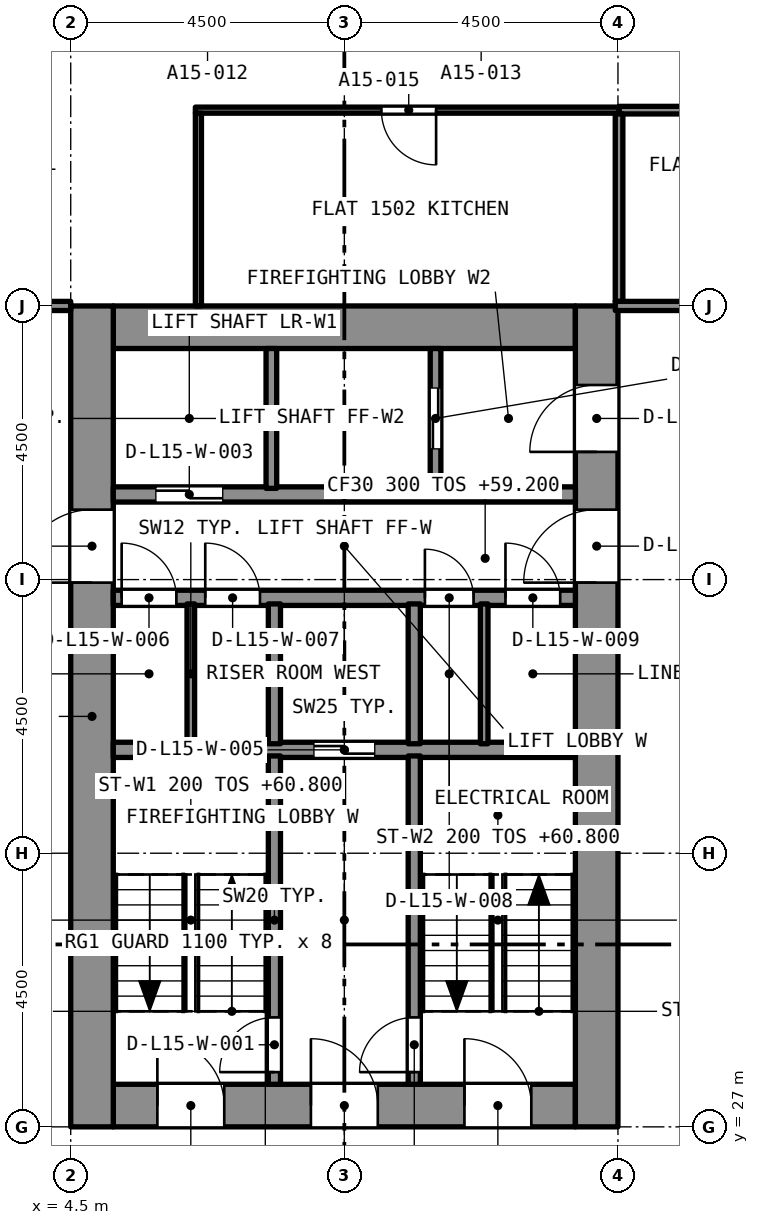
"""IFC4 building model, lengths in metres.
Left out: names, types, materials, properties, quantities, classifications, styles, units other than length and angle.
Written with IfcOpenShell. Run it as: python <this file> out.ifc"""

import sys

from ifc_helpers import new_model, si_unit, direction, frame, frame_2d, origin, place, context, subcontext, project, spatial, rectangle, extrude, element, fill, save


model = new_model("IFC4")
c1 = context("Model", 3, precision=1e-05, world=origin(), true_north=direction((0.0, 1.0)))
c2 = subcontext(c1, "Body", "Model", "MODEL_VIEW")
j1 = project(units=[si_unit("LENGTHUNIT", "METRE"), si_unit("PLANEANGLEUNIT", "RADIAN")], contexts=[c1])
p1 = place(None, origin())
s1 = spatial("IfcSite", under=j1, at=p1, CompositionType="ELEMENT")
p2 = place(p1, origin())
s2 = spatial("IfcBuilding", under=s1, at=p2, CompositionType="ELEMENT")
p3 = place(p2, frame((0.0, 0.0, 59.2)))
s3 = spatial("IfcBuildingStorey", under=s2, at=p3, CompositionType="ELEMENT", Elevation=59.2)
p4 = place(p3, frame((5.2, 27.35, 0.0), z_axis=(0.0, 0.0, 1.0), x_axis=(1.0, 0.0, 0.0)))
e1 = element("IfcWall", 1, at=p4, inside=s3, PredefinedType="SOLIDWALL", context=c2, shape_type="SweptSolid", body=[
    extrude(rectangle(XDim=7.6, YDim=0.7, at=frame_2d((3.8, 0.0))), origin(), (0.0, 0.0, 1.0), 3.2),
])
p5 = place(p4, frame((0.725, 0.0, 0.0)))
e2 = element("IfcOpeningElement", 2, at=p5, cuts=e1, PredefinedType="OPENING", context=c2, shape_type="SweptSolid", body=[
    extrude(rectangle(XDim=1.1, YDim=2.1, at=frame_2d((0.55, 1.05))), frame((0.0, 0.36, 0.0), z_axis=(0.0, -1.0, 0.0), x_axis=(1.0, 0.0, 0.0)), (0.0, 0.0, 1.0), 0.72),
])
p6 = place(p4, frame((3.25, 0.0, 0.0)))
e3 = element("IfcOpeningElement", 3, at=p6, cuts=e1, PredefinedType="OPENING", context=c2, shape_type="SweptSolid", body=[
    extrude(rectangle(XDim=1.1, YDim=2.1, at=frame_2d((0.55, 1.05))), frame((0.0, 0.36, 0.0), z_axis=(0.0, -1.0, 0.0), x_axis=(1.0, 0.0, 0.0)), (0.0, 0.0, 1.0), 0.72),
])
p7 = place(p4, frame((5.775, 0.0, 0.0)))
e4 = element("IfcOpeningElement", 4, at=p7, cuts=e1, PredefinedType="OPENING", context=c2, shape_type="SweptSolid", body=[
    extrude(rectangle(XDim=1.1, YDim=2.1, at=frame_2d((0.55, 1.05))), frame((0.0, 0.36, 0.0), z_axis=(0.0, -1.0, 0.0), x_axis=(1.0, 0.0, 0.0)), (0.0, 0.0, 1.0), 0.72),
])
p8 = place(p3, frame((5.2, 40.15, 0.0), z_axis=(0.0, 0.0, 1.0), x_axis=(1.0, 0.0, 0.0)))
e5 = element("IfcWall", 5, at=p8, inside=s3, PredefinedType="SOLIDWALL", context=c2, shape_type="SweptSolid", body=[
    extrude(rectangle(XDim=7.6, YDim=0.7, at=frame_2d((3.8, 0.0))), origin(), (0.0, 0.0, 1.0), 3.2),
])
p9 = place(p3, frame((4.85, 27.0, 0.0), z_axis=(0.0, 0.0, 1.0), x_axis=(0.0, 1.0, 0.0)))
e6 = element("IfcWall", 6, at=p9, inside=s3, PredefinedType="SOLIDWALL", context=c2, shape_type="SweptSolid", body=[
    extrude(rectangle(XDim=13.5, YDim=0.7, at=frame_2d((6.75, 0.0))), origin(), (0.0, 0.0, 1.0), 3.2),
])
p10 = place(p9, frame((8.95, 0.0, 0.0)))
e7 = element("IfcOpeningElement", 7, at=p10, cuts=e6, PredefinedType="OPENING", context=c2, shape_type="SweptSolid", body=[
    extrude(rectangle(XDim=1.2, YDim=2.1, at=frame_2d((0.6, 1.05))), frame((0.0, 0.36, 0.0), z_axis=(0.0, -1.0, 0.0), x_axis=(1.0, 0.0, 0.0)), (0.0, 0.0, 1.0), 0.72),
])
p11 = place(p3, frame((13.15, 27.0, 0.0), z_axis=(0.0, 0.0, 1.0), x_axis=(0.0, 1.0, 0.0)))
e8 = element("IfcWall", 8, at=p11, inside=s3, PredefinedType="SOLIDWALL", context=c2, shape_type="SweptSolid", body=[
    extrude(rectangle(XDim=13.5, YDim=0.7, at=frame_2d((6.75, 0.0))), origin(), (0.0, 0.0, 1.0), 3.2),
])
p12 = place(p11, frame((11.1, 0.0, 0.0)))
e9 = element("IfcOpeningElement", 9, at=p12, cuts=e8, PredefinedType="OPENING", context=c2, shape_type="SweptSolid", body=[
    extrude(rectangle(XDim=1.1, YDim=2.1, at=frame_2d((0.55, 1.05))), frame((0.0, 0.36, 0.0), z_axis=(0.0, -1.0, 0.0), x_axis=(1.0, 0.0, 0.0)), (0.0, 0.0, 1.0), 0.72),
])
p13 = place(p11, frame((8.95, 0.0, 0.0)))
e10 = element("IfcOpeningElement", 10, at=p13, cuts=e8, PredefinedType="OPENING", context=c2, shape_type="SweptSolid", body=[
    extrude(rectangle(XDim=1.2, YDim=2.1, at=frame_2d((0.6, 1.05))), frame((0.0, 0.36, 0.0), z_axis=(0.0, -1.0, 0.0), x_axis=(1.0, 0.0, 0.0)), (0.0, 0.0, 1.0), 0.72),
])
p14 = place(p3, frame((17.875, 43.72, 0.0), z_axis=(0.0, 0.0, 1.0), x_axis=(-1.0, 0.0, 0.0)))
e11 = element("IfcWall", 11, at=p14, inside=s3, PredefinedType="PARTITIONING", context=c2, shape_type="SweptSolid", body=[
    extrude(rectangle(XDim=4.357, YDim=0.125, at=frame_2d((2.178, 0.0))), origin(), (0.0, 0.0, 1.0), 2.9),
])
p15 = place(p14, frame((1.716, 0.0, 0.0)))
e12 = element("IfcOpeningElement", 12, at=p15, cuts=e11, PredefinedType="OPENING", context=c2, shape_type="SweptSolid", body=[
    extrude(rectangle(XDim=0.8, YDim=2.1, at=frame_2d((0.4, 1.05))), frame((0.0, 0.073, 0.0), z_axis=(0.0, -1.0, 0.0), x_axis=(1.0, 0.0, 0.0)), (0.0, 0.0, 1.0), 0.145),
])
p16 = place(p3, frame((13.518, 40.575, 0.0), z_axis=(0.0, 0.0, 1.0), x_axis=(0.0, 1.0, 0.0)))
e13 = element("IfcWall", 13, at=p16, inside=s3, PredefinedType="PARTITIONING", context=c2, shape_type="SweptSolid", body=[
    extrude(rectangle(XDim=3.083, YDim=0.125, at=frame_2d((1.541, 0.0))), origin(), (0.0, 0.0, 1.0), 2.9),
])
p17 = place(p3, frame((13.456, 40.5, 0.0), z_axis=(0.0, 0.0, 1.0), x_axis=(1.0, 0.0, 0.0)))
e14 = element("IfcWall", 14, at=p17, inside=s3, PredefinedType="PARTITIONING", context=c2, shape_type="SweptSolid", body=[
    extrude(rectangle(XDim=3.844, YDim=0.15, at=frame_2d((1.922, 0.0))), origin(), (0.0, 0.0, 1.0), 2.9),
])
p18 = place(p3, frame((13.518, 43.72, 0.0), z_axis=(0.0, 0.0, 1.0), x_axis=(-1.0, 0.0, 0.0)))
e15 = element("IfcWall", 15, at=p18, inside=s3, PredefinedType="PARTITIONING", context=c2, shape_type="SweptSolid", body=[
    extrude(rectangle(XDim=6.968, YDim=0.1, at=frame_2d((3.484, 0.0))), origin(), (0.0, 0.0, 1.0), 2.9),
])
p19 = place(p18, frame((3.009, 0.0, 0.0)))
e16 = element("IfcOpeningElement", 16, at=p19, cuts=e15, PredefinedType="OPENING", context=c2, shape_type="SweptSolid", body=[
    extrude(rectangle(XDim=0.9, YDim=2.1, at=frame_2d((0.45, 1.05))), frame((0.0, 0.06, 0.0), z_axis=(0.0, -1.0, 0.0), x_axis=(1.0, 0.0, 0.0)), (0.0, 0.0, 1.0), 0.12),
])
p20 = place(p3, frame((6.6, 40.5, 0.0), z_axis=(0.0, 0.0, 1.0), x_axis=(0.0, 1.0, 0.0)))
e17 = element("IfcWall", 17, at=p20, inside=s3, PredefinedType="PARTITIONING", context=c2, shape_type="SweptSolid", body=[
    extrude(rectangle(XDim=3.17, YDim=0.1, at=frame_2d((1.585, 0.0))), origin(), (0.0, 0.0, 1.0), 2.9),
])
p21 = place(p3, frame((0.7, 40.5, 0.0), z_axis=(0.0, 0.0, 1.0), x_axis=(1.0, 0.0, 0.0)))
e18 = element("IfcWall", 18, at=p21, inside=s3, PredefinedType="PARTITIONING", context=c2, shape_type="SweptSolid", body=[
    extrude(rectangle(XDim=3.8, YDim=0.15, at=frame_2d((1.9, 0.0))), origin(), (0.0, 0.0, 1.0), 2.9),
])
p22 = place(p21, frame((1.05, 0.0, 0.0)))
e19 = element("IfcOpeningElement", 19, at=p22, cuts=e18, PredefinedType="OPENING", context=c2, shape_type="SweptSolid", body=[
    extrude(rectangle(XDim=1.0, YDim=2.1, at=frame_2d((0.5, 1.05))), frame((0.0, 0.085, 0.0), z_axis=(0.0, -1.0, 0.0), x_axis=(1.0, 0.0, 0.0)), (0.0, 0.0, 1.0), 0.17),
])
p23 = place(p3, frame((5.2, 33.2, 0.0), z_axis=(0.0, 0.0, 1.0), x_axis=(1.0, 0.0, 0.0)))
e20 = element("IfcWall", 20, at=p23, inside=s3, PredefinedType="SOLIDWALL", context=c2, shape_type="SweptSolid", body=[
    extrude(rectangle(XDim=7.6, YDim=0.25, at=frame_2d((3.8, 0.0))), origin(), (0.0, 0.0, 1.0), 2.9),
])
p24 = place(p23, frame((3.3, 0.0, 0.0)))
e21 = element("IfcOpeningElement", 21, at=p24, cuts=e20, PredefinedType="OPENING", context=c2, shape_type="SweptSolid", body=[
    extrude(rectangle(XDim=1.0, YDim=2.1, at=frame_2d((0.5, 1.05))), frame((0.0, 0.135, 0.0), z_axis=(0.0, -1.0, 0.0), x_axis=(1.0, 0.0, 0.0)), (0.0, 0.0, 1.0), 0.27),
])
p25 = place(p3, frame((5.2, 35.7, 0.0), z_axis=(0.0, 0.0, 1.0), x_axis=(1.0, 0.0, 0.0)))
e22 = element("IfcWall", 22, at=p25, inside=s3, PredefinedType="SOLIDWALL", context=c2, shape_type="SweptSolid", body=[
    extrude(rectangle(XDim=7.6, YDim=0.25, at=frame_2d((3.8, 0.0))), origin(), (0.0, 0.0, 1.0), 2.9),
])
p26 = place(p25, frame((0.137, 0.0, 0.0)))
e23 = element("IfcOpeningElement", 23, at=p26, cuts=e22, PredefinedType="OPENING", context=c2, shape_type="SweptSolid", body=[
    extrude(rectangle(XDim=0.9, YDim=2.1, at=frame_2d((0.45, 1.05))), frame((0.0, 0.135, 0.0), z_axis=(0.0, -1.0, 0.0), x_axis=(1.0, 0.0, 0.0)), (0.0, 0.0, 1.0), 0.27),
])
p27 = place(p25, frame((1.512, 0.0, 0.0)))
e24 = element("IfcOpeningElement", 24, at=p27, cuts=e22, PredefinedType="OPENING", context=c2, shape_type="SweptSolid", body=[
    extrude(rectangle(XDim=0.9, YDim=2.1, at=frame_2d((0.45, 1.05))), frame((0.0, 0.135, 0.0), z_axis=(0.0, -1.0, 0.0), x_axis=(1.0, 0.0, 0.0)), (0.0, 0.0, 1.0), 0.27),
])
p28 = place(p25, frame((5.125, 0.0, 0.0)))
e25 = element("IfcOpeningElement", 25, at=p28, cuts=e22, PredefinedType="OPENING", context=c2, shape_type="SweptSolid", body=[
    extrude(rectangle(XDim=0.8, YDim=2.1, at=frame_2d((0.4, 1.05))), frame((0.0, 0.135, 0.0), z_axis=(0.0, -1.0, 0.0), x_axis=(1.0, 0.0, 0.0)), (0.0, 0.0, 1.0), 0.27),
])
p29 = place(p25, frame((6.45, 0.0, 0.0)))
e26 = element("IfcOpeningElement", 26, at=p29, cuts=e22, PredefinedType="OPENING", context=c2, shape_type="SweptSolid", body=[
    extrude(rectangle(XDim=0.9, YDim=2.1, at=frame_2d((0.45, 1.05))), frame((0.0, 0.135, 0.0), z_axis=(0.0, -1.0, 0.0), x_axis=(1.0, 0.0, 0.0)), (0.0, 0.0, 1.0), 0.27),
])
p30 = place(p3, frame((5.2, 37.4, 0.0), z_axis=(0.0, 0.0, 1.0), x_axis=(1.0, 0.0, 0.0)))
e27 = element("IfcWall", 27, at=p30, inside=s3, PredefinedType="SOLIDWALL", context=c2, shape_type="SweptSolid", body=[
    extrude(rectangle(XDim=7.6, YDim=0.25, at=frame_2d((3.8, 0.0))), origin(), (0.0, 0.0, 1.0), 2.9),
])
p31 = place(p30, frame((0.7, 0.0, 0.0)))
e28 = element("IfcOpeningElement", 28, at=p31, cuts=e27, PredefinedType="OPENING", context=c2, shape_type="SweptSolid", body=[
    extrude(rectangle(XDim=1.1, YDim=2.4, at=frame_2d((0.55, 1.2))), frame((0.0, 0.135, 0.0), z_axis=(0.0, -1.0, 0.0), x_axis=(1.0, 0.0, 0.0)), (0.0, 0.0, 1.0), 0.27),
])
p32 = place(p3, frame((7.85, 27.7, 0.0), z_axis=(0.0, 0.0, 1.0), x_axis=(0.0, 1.0, 0.0)))
e29 = element("IfcWall", 29, at=p32, inside=s3, PredefinedType="SOLIDWALL", context=c2, shape_type="SweptSolid", body=[
    extrude(rectangle(XDim=5.4, YDim=0.2, at=frame_2d((2.7, 0.0))), origin(), (0.0, 0.0, 1.0), 2.9),
])
p33 = place(p32, frame((0.2, 0.0, 0.0)))
e30 = element("IfcOpeningElement", 30, at=p33, cuts=e29, PredefinedType="OPENING", context=c2, shape_type="SweptSolid", body=[
    extrude(rectangle(XDim=0.9, YDim=2.1, at=frame_2d((0.45, 1.05))), frame((0.0, 0.11, 0.0), z_axis=(0.0, -1.0, 0.0), x_axis=(1.0, 0.0, 0.0)), (0.0, 0.0, 1.0), 0.22),
])
p34 = place(p3, frame((10.15, 27.7, 0.0), z_axis=(0.0, 0.0, 1.0), x_axis=(0.0, 1.0, 0.0)))
e31 = element("IfcWall", 31, at=p34, inside=s3, PredefinedType="SOLIDWALL", context=c2, shape_type="SweptSolid", body=[
    extrude(rectangle(XDim=5.4, YDim=0.2, at=frame_2d((2.7, 0.0))), origin(), (0.0, 0.0, 1.0), 2.9),
])
p35 = place(p34, frame((0.2, 0.0, 0.0)))
e32 = element("IfcOpeningElement", 32, at=p35, cuts=e31, PredefinedType="OPENING", context=c2, shape_type="SweptSolid", body=[
    extrude(rectangle(XDim=0.9, YDim=2.1, at=frame_2d((0.45, 1.05))), frame((0.0, 0.11, 0.0), z_axis=(0.0, -1.0, 0.0), x_axis=(1.0, 0.0, 0.0)), (0.0, 0.0, 1.0), 0.22),
])
for number, where, z_axis, x_axis in (
    (33, (7.85, 33.3, 0.0), (0.0, 0.0, 1.0), (0.0, 1.0, 0.0)),
    (34, (10.15, 33.3, 0.0), (0.0, 0.0, 1.0), (0.0, 1.0, 0.0)),
):
    element("IfcWall", number, at=place(p3, frame(where, z_axis=z_axis, x_axis=x_axis)), inside=s3, PredefinedType="SOLIDWALL", context=c2, shape_type="SweptSolid", body=[
        extrude(rectangle(XDim=2.3, YDim=0.2, at=frame_2d((1.15, 0.0))), origin(), (0.0, 0.0, 1.0), 2.9),
    ])
p36 = place(p3, frame((7.8, 37.5, 0.0), z_axis=(0.0, 0.0, 1.0), x_axis=(0.0, 1.0, 0.0)))
e35 = element("IfcWall", 35, at=p36, inside=s3, PredefinedType="SOLIDWALL", context=c2, shape_type="SweptSolid", body=[
    extrude(rectangle(XDim=2.3, YDim=0.175, at=frame_2d((1.15, 0.0))), origin(), (0.0, 0.0, 1.0), 2.9),
])
p37 = place(p3, frame((10.5, 37.5, 0.0), z_axis=(0.0, 0.0, 1.0), x_axis=(0.0, 1.0, 0.0)))
e36 = element("IfcWall", 36, at=p37, inside=s3, PredefinedType="SOLIDWALL", context=c2, shape_type="SweptSolid", body=[
    extrude(rectangle(XDim=2.3, YDim=0.175, at=frame_2d((1.15, 0.0))), origin(), (0.0, 0.0, 1.0), 2.9),
])
p38 = place(p37, frame((0.65, 0.0, 0.0)))
e37 = element("IfcOpeningElement", 37, at=p38, cuts=e36, PredefinedType="OPENING", context=c2, shape_type="SweptSolid", body=[
    extrude(rectangle(XDim=1.0, YDim=2.1, at=frame_2d((0.5, 1.05))), frame((0.0, 0.097, 0.0), z_axis=(0.0, -1.0, 0.0), x_axis=(1.0, 0.0, 0.0)), (0.0, 0.0, 1.0), 0.195),
])
for number, where, z_axis, x_axis in (
    (38, (6.475, 33.3, 0.0), (0.0, 0.0, 1.0), (0.0, 1.0, 0.0)),
    (39, (11.3, 33.3, 0.0), (0.0, 0.0, 1.0), (0.0, 1.0, 0.0)),
):
    element("IfcWall", number, at=place(p3, frame(where, z_axis=z_axis, x_axis=x_axis)), inside=s3, PredefinedType="PARTITIONING", context=c2, shape_type="SweptSolid", body=[
        extrude(rectangle(XDim=2.3, YDim=0.125, at=frame_2d((1.15, 0.0))), origin(), (0.0, 0.0, 1.0), 2.9),
    ])
p39 = place(p19, origin())
e40 = element("IfcDoor", 40, at=p39, inside=s3, OperationType="SINGLE_SWING_LEFT", PredefinedType="DOOR", context=c2, shape_type="SweptSolid", body=[
    extrude(rectangle(XDim=0.9, YDim=2.1, at=frame_2d((0.45, 1.05))), frame((0.0, 0.025, 0.0), z_axis=(0.0, -1.0, 0.0), x_axis=(1.0, 0.0, 0.0)), (0.0, 0.0, 1.0), 0.05),
])
fill(e16, e40)
p40 = place(p33, origin())
e41 = element("IfcDoor", 41, at=p40, inside=s3, OperationType="SINGLE_SWING_LEFT", PredefinedType="DOOR", context=c2, shape_type="SweptSolid", body=[
    extrude(rectangle(XDim=0.9, YDim=2.1, at=frame_2d((0.45, 1.05))), frame((0.0, 0.025, 0.0), z_axis=(0.0, -1.0, 0.0), x_axis=(1.0, 0.0, 0.0)), (0.0, 0.0, 1.0), 0.05),
])
fill(e30, e41)
p41 = place(p35, origin())
e42 = element("IfcDoor", 42, at=p41, inside=s3, OperationType="SINGLE_SWING_LEFT", PredefinedType="DOOR", context=c2, shape_type="SweptSolid", body=[
    extrude(rectangle(XDim=0.9, YDim=2.1, at=frame_2d((0.45, 1.05))), frame((0.0, 0.025, 0.0), z_axis=(0.0, -1.0, 0.0), x_axis=(1.0, 0.0, 0.0)), (0.0, 0.0, 1.0), 0.05),
])
fill(e32, e42)
p42 = place(p31, origin())
e43 = element("IfcDoor", 43, at=p42, inside=s3, OperationType="SLIDING_TO_LEFT", PredefinedType="DOOR", context=c2, shape_type="SweptSolid", body=[
    extrude(rectangle(XDim=1.1, YDim=2.4, at=frame_2d((0.55, 1.2))), frame((0.0, 0.025, 0.0), z_axis=(0.0, -1.0, 0.0), x_axis=(1.0, 0.0, 0.0)), (0.0, 0.0, 1.0), 0.05),
])
fill(e28, e43)
p43 = place(p38, origin())
e44 = element("IfcDoor", 44, at=p43, inside=s3, OperationType="SLIDING_TO_LEFT", PredefinedType="DOOR", context=c2, shape_type="SweptSolid", body=[
    extrude(rectangle(XDim=1.0, YDim=2.1, at=frame_2d((0.5, 1.05))), frame((0.0, 0.025, 0.0), z_axis=(0.0, -1.0, 0.0), x_axis=(1.0, 0.0, 0.0)), (0.0, 0.0, 1.0), 0.05),
])
fill(e37, e44)
p44 = place(p24, origin())
e45 = element("IfcDoor", 45, at=p44, inside=s3, OperationType="SLIDING_TO_LEFT", PredefinedType="DOOR", context=c2, shape_type="SweptSolid", body=[
    extrude(rectangle(XDim=1.0, YDim=2.1, at=frame_2d((0.5, 1.05))), frame((0.0, 0.025, 0.0), z_axis=(0.0, -1.0, 0.0), x_axis=(1.0, 0.0, 0.0)), (0.0, 0.0, 1.0), 0.05),
])
fill(e21, e45)
p45 = place(p26, origin())
e46 = element("IfcDoor", 46, at=p45, inside=s3, OperationType="SINGLE_SWING_LEFT", PredefinedType="DOOR", context=c2, shape_type="SweptSolid", body=[
    extrude(rectangle(XDim=0.9, YDim=2.1, at=frame_2d((0.45, 1.05))), frame((0.0, 0.025, 0.0), z_axis=(0.0, -1.0, 0.0), x_axis=(1.0, 0.0, 0.0)), (0.0, 0.0, 1.0), 0.05),
])
fill(e23, e46)
p46 = place(p27, origin())
e47 = element("IfcDoor", 47, at=p46, inside=s3, OperationType="SINGLE_SWING_LEFT", PredefinedType="DOOR", context=c2, shape_type="SweptSolid", body=[
    extrude(rectangle(XDim=0.9, YDim=2.1, at=frame_2d((0.45, 1.05))), frame((0.0, 0.025, 0.0), z_axis=(0.0, -1.0, 0.0), x_axis=(1.0, 0.0, 0.0)), (0.0, 0.0, 1.0), 0.05),
])
fill(e24, e47)
p47 = place(p28, origin())
e48 = element("IfcDoor", 48, at=p47, inside=s3, OperationType="SINGLE_SWING_LEFT", PredefinedType="DOOR", context=c2, shape_type="SweptSolid", body=[
    extrude(rectangle(XDim=0.8, YDim=2.1, at=frame_2d((0.4, 1.05))), frame((0.0, 0.025, 0.0), z_axis=(0.0, -1.0, 0.0), x_axis=(1.0, 0.0, 0.0)), (0.0, 0.0, 1.0), 0.05),
])
fill(e25, e48)
p48 = place(p29, origin())
e49 = element("IfcDoor", 49, at=p48, inside=s3, OperationType="SINGLE_SWING_LEFT", PredefinedType="DOOR", context=c2, shape_type="SweptSolid", body=[
    extrude(rectangle(XDim=0.9, YDim=2.1, at=frame_2d((0.45, 1.05))), frame((0.0, 0.025, 0.0), z_axis=(0.0, -1.0, 0.0), x_axis=(1.0, 0.0, 0.0)), (0.0, 0.0, 1.0), 0.05),
])
fill(e26, e49)
p49 = place(p5, origin())
e50 = element("IfcDoor", 50, at=p49, inside=s3, OperationType="SINGLE_SWING_LEFT", PredefinedType="DOOR", context=c2, shape_type="SweptSolid", body=[
    extrude(rectangle(XDim=1.1, YDim=2.1, at=frame_2d((0.55, 1.05))), frame((0.0, 0.025, 0.0), z_axis=(0.0, -1.0, 0.0), x_axis=(1.0, 0.0, 0.0)), (0.0, 0.0, 1.0), 0.05),
])
fill(e2, e50)
p50 = place(p6, origin())
e51 = element("IfcDoor", 51, at=p50, inside=s3, OperationType="SINGLE_SWING_LEFT", PredefinedType="DOOR", context=c2, shape_type="SweptSolid", body=[
    extrude(rectangle(XDim=1.1, YDim=2.1, at=frame_2d((0.55, 1.05))), frame((0.0, 0.025, 0.0), z_axis=(0.0, -1.0, 0.0), x_axis=(1.0, 0.0, 0.0)), (0.0, 0.0, 1.0), 0.05),
])
fill(e3, e51)
p51 = place(p7, origin())
e52 = element("IfcDoor", 52, at=p51, inside=s3, OperationType="SINGLE_SWING_LEFT", PredefinedType="DOOR", context=c2, shape_type="SweptSolid", body=[
    extrude(rectangle(XDim=1.1, YDim=2.1, at=frame_2d((0.55, 1.05))), frame((0.0, 0.025, 0.0), z_axis=(0.0, -1.0, 0.0), x_axis=(1.0, 0.0, 0.0)), (0.0, 0.0, 1.0), 0.05),
])
fill(e4, e52)
p52 = place(p12, origin())
e53 = element("IfcDoor", 53, at=p52, inside=s3, OperationType="SINGLE_SWING_LEFT", PredefinedType="DOOR", context=c2, shape_type="SweptSolid", body=[
    extrude(rectangle(XDim=1.1, YDim=2.1, at=frame_2d((0.55, 1.05))), frame((0.0, 0.025, 0.0), z_axis=(0.0, -1.0, 0.0), x_axis=(1.0, 0.0, 0.0)), (0.0, 0.0, 1.0), 0.05),
])
fill(e9, e53)
p53 = place(p10, origin())
e54 = element("IfcDoor", 54, at=p53, inside=s3, OperationType="SINGLE_SWING_LEFT", PredefinedType="DOOR", context=c2, shape_type="SweptSolid", body=[
    extrude(rectangle(XDim=1.2, YDim=2.1, at=frame_2d((0.6, 1.05))), frame((0.0, 0.025, 0.0), z_axis=(0.0, -1.0, 0.0), x_axis=(1.0, 0.0, 0.0)), (0.0, 0.0, 1.0), 0.05),
])
fill(e7, e54)
p54 = place(p13, origin())
e55 = element("IfcDoor", 55, at=p54, inside=s3, OperationType="SINGLE_SWING_LEFT", PredefinedType="DOOR", context=c2, shape_type="SweptSolid", body=[
    extrude(rectangle(XDim=1.2, YDim=2.1, at=frame_2d((0.6, 1.05))), frame((0.0, 0.025, 0.0), z_axis=(0.0, -1.0, 0.0), x_axis=(1.0, 0.0, 0.0)), (0.0, 0.0, 1.0), 0.05),
])
fill(e10, e55)
save(model, sys.argv[1])
